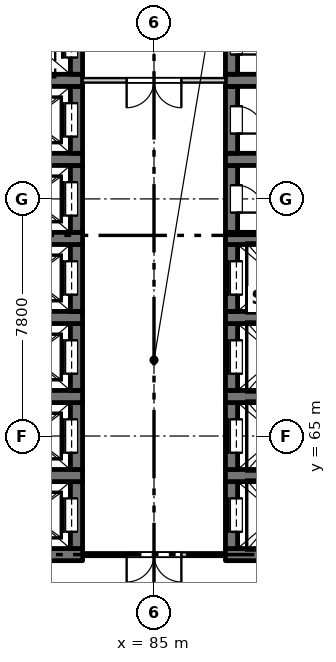
"""IFC4 building model, lengths in metres.
Left out: names, types, materials, properties, quantities, classifications, styles, units other than length and angle.
Written with IfcOpenShell. Run it as: python <this file> out.ifc"""

import sys

from ifc_helpers import new_model, si_unit, direction, frame, frame_2d, origin, place, context, subcontext, project, spatial, rectangle, extrude, element, fill, save


model = new_model("IFC4")
c1 = context("Model", 3, precision=1e-05, world=origin(), true_north=direction((0.0, 1.0)))
c2 = subcontext(c1, "Body", "Model", "MODEL_VIEW")
j1 = project(units=[si_unit("LENGTHUNIT", "METRE"), si_unit("PLANEANGLEUNIT", "RADIAN")], contexts=[c1])
p1 = place(None, origin())
s1 = spatial("IfcSite", under=j1, at=p1, CompositionType="ELEMENT")
p2 = place(p1, origin())
s2 = spatial("IfcBuilding", under=s1, at=p2, CompositionType="ELEMENT")
p3 = place(p2, origin())
s3 = spatial("IfcBuildingStorey", under=s2, at=p3, CompositionType="ELEMENT", Elevation=0.0)
p4 = place(p3, frame((79.65, 61.1, -0.4), z_axis=(0.0, 0.0, 1.0), x_axis=(1.0, 0.0, 0.0)))
e1 = element("IfcWall", 1, at=p4, inside=s3, PredefinedType="SOLIDWALL", context=c2, shape_type="SweptSolid", body=[
    extrude(rectangle(XDim=3.0, YDim=0.4, at=frame_2d((1.5, 0.0))), origin(), (0.0, 0.0, 1.0), 6.1),
])
p5 = place(p3, frame((82.45, 61.3, -0.4), z_axis=(0.0, 0.0, 1.0), x_axis=(0.0, 1.0, 0.0)))
e2 = element("IfcWall", 2, at=p5, inside=s3, PredefinedType="SOLIDWALL", context=c2, shape_type="SweptSolid", body=[
    extrude(rectangle(XDim=2.2, YDim=0.4, at=frame_2d((1.1, 0.0))), origin(), (0.0, 0.0, 1.0), 6.1),
])
p6 = place(p5, frame((0.55, 0.0, 0.4)))
e3 = element("IfcOpeningElement", 3, at=p6, cuts=e2, PredefinedType="OPENING", context=c2, shape_type="SweptSolid", body=[
    extrude(rectangle(XDim=1.1, YDim=2.1, at=frame_2d((0.55, 1.05))), frame((0.0, 0.21, 0.0), z_axis=(0.0, -1.0, 0.0), x_axis=(1.0, 0.0, 0.0)), (0.0, 0.0, 1.0), 0.42),
])
p7 = place(p3, frame((79.65, 63.7, -0.4), z_axis=(0.0, 0.0, 1.0), x_axis=(1.0, 0.0, 0.0)))
e4 = element("IfcWall", 4, at=p7, inside=s3, PredefinedType="SOLIDWALL", context=c2, shape_type="SweptSolid", body=[
    extrude(rectangle(XDim=3.0, YDim=0.4, at=frame_2d((1.5, 0.0))), origin(), (0.0, 0.0, 1.0), 6.1),
])
p8 = place(p3, frame((82.45, 63.9, -0.4), z_axis=(0.0, 0.0, 1.0), x_axis=(0.0, 1.0, 0.0)))
e5 = element("IfcWall", 5, at=p8, inside=s3, PredefinedType="SOLIDWALL", context=c2, shape_type="SweptSolid", body=[
    extrude(rectangle(XDim=2.2, YDim=0.4, at=frame_2d((1.1, 0.0))), origin(), (0.0, 0.0, 1.0), 6.1),
])
p9 = place(p8, frame((0.55, 0.0, 0.4)))
e6 = element("IfcOpeningElement", 6, at=p9, cuts=e5, PredefinedType="OPENING", context=c2, shape_type="SweptSolid", body=[
    extrude(rectangle(XDim=1.1, YDim=2.1, at=frame_2d((0.55, 1.05))), frame((0.0, 0.21, 0.0), z_axis=(0.0, -1.0, 0.0), x_axis=(1.0, 0.0, 0.0)), (0.0, 0.0, 1.0), 0.42),
])
p10 = place(p3, frame((79.65, 66.3, -0.4), z_axis=(0.0, 0.0, 1.0), x_axis=(1.0, 0.0, 0.0)))
e7 = element("IfcWall", 7, at=p10, inside=s3, PredefinedType="SOLIDWALL", context=c2, shape_type="SweptSolid", body=[
    extrude(rectangle(XDim=3.0, YDim=0.4, at=frame_2d((1.5, 0.0))), origin(), (0.0, 0.0, 1.0), 6.1),
])
p11 = place(p3, frame((82.45, 66.5, -0.4), z_axis=(0.0, 0.0, 1.0), x_axis=(0.0, 1.0, 0.0)))
e8 = element("IfcWall", 8, at=p11, inside=s3, PredefinedType="SOLIDWALL", context=c2, shape_type="SweptSolid", body=[
    extrude(rectangle(XDim=2.2, YDim=0.4, at=frame_2d((1.1, 0.0))), origin(), (0.0, 0.0, 1.0), 6.1),
])
p12 = place(p11, frame((0.55, 0.0, 0.4)))
e9 = element("IfcOpeningElement", 9, at=p12, cuts=e8, PredefinedType="OPENING", context=c2, shape_type="SweptSolid", body=[
    extrude(rectangle(XDim=1.1, YDim=2.1, at=frame_2d((0.55, 1.05))), frame((0.0, 0.21, 0.0), z_axis=(0.0, -1.0, 0.0), x_axis=(1.0, 0.0, 0.0)), (0.0, 0.0, 1.0), 0.42),
])
p13 = place(p3, frame((79.65, 68.9, -0.4), z_axis=(0.0, 0.0, 1.0), x_axis=(1.0, 0.0, 0.0)))
e10 = element("IfcWall", 10, at=p13, inside=s3, PredefinedType="SOLIDWALL", context=c2, shape_type="SweptSolid", body=[
    extrude(rectangle(XDim=3.0, YDim=0.4, at=frame_2d((1.5, 0.0))), origin(), (0.0, 0.0, 1.0), 6.1),
])
p14 = place(p3, frame((82.45, 69.1, -0.4), z_axis=(0.0, 0.0, 1.0), x_axis=(0.0, 1.0, 0.0)))
e11 = element("IfcWall", 11, at=p14, inside=s3, PredefinedType="SOLIDWALL", context=c2, shape_type="SweptSolid", body=[
    extrude(rectangle(XDim=2.2, YDim=0.4, at=frame_2d((1.1, 0.0))), origin(), (0.0, 0.0, 1.0), 6.1),
])
p15 = place(p14, frame((0.55, 0.0, 0.4)))
e12 = element("IfcOpeningElement", 12, at=p15, cuts=e11, PredefinedType="OPENING", context=c2, shape_type="SweptSolid", body=[
    extrude(rectangle(XDim=1.1, YDim=2.1, at=frame_2d((0.55, 1.05))), frame((0.0, 0.21, 0.0), z_axis=(0.0, -1.0, 0.0), x_axis=(1.0, 0.0, 0.0)), (0.0, 0.0, 1.0), 0.42),
])
p16 = place(p3, frame((79.65, 71.5, -0.4), z_axis=(0.0, 0.0, 1.0), x_axis=(1.0, 0.0, 0.0)))
e13 = element("IfcWall", 13, at=p16, inside=s3, PredefinedType="SOLIDWALL", context=c2, shape_type="SweptSolid", body=[
    extrude(rectangle(XDim=3.0, YDim=0.4, at=frame_2d((1.5, 0.0))), origin(), (0.0, 0.0, 1.0), 6.1),
])
p17 = place(p3, frame((82.45, 71.7, -0.4), z_axis=(0.0, 0.0, 1.0), x_axis=(0.0, 1.0, 0.0)))
e14 = element("IfcWall", 14, at=p17, inside=s3, PredefinedType="SOLIDWALL", context=c2, shape_type="SweptSolid", body=[
    extrude(rectangle(XDim=2.2, YDim=0.4, at=frame_2d((1.1, 0.0))), origin(), (0.0, 0.0, 1.0), 6.1),
])
p18 = place(p17, frame((0.55, 0.0, 0.4)))
e15 = element("IfcOpeningElement", 15, at=p18, cuts=e14, PredefinedType="OPENING", context=c2, shape_type="SweptSolid", body=[
    extrude(rectangle(XDim=1.1, YDim=2.1, at=frame_2d((0.55, 1.05))), frame((0.0, 0.21, 0.0), z_axis=(0.0, -1.0, 0.0), x_axis=(1.0, 0.0, 0.0)), (0.0, 0.0, 1.0), 0.42),
])
p19 = place(p3, frame((79.65, 74.1, -0.4), z_axis=(0.0, 0.0, 1.0), x_axis=(1.0, 0.0, 0.0)))
e16 = element("IfcWall", 16, at=p19, inside=s3, PredefinedType="SOLIDWALL", context=c2, shape_type="SweptSolid", body=[
    extrude(rectangle(XDim=3.0, YDim=0.4, at=frame_2d((1.5, 0.0))), origin(), (0.0, 0.0, 1.0), 6.1),
])
p20 = place(p3, frame((82.45, 74.3, -0.4), z_axis=(0.0, 0.0, 1.0), x_axis=(0.0, 1.0, 0.0)))
e17 = element("IfcWall", 17, at=p20, inside=s3, PredefinedType="SOLIDWALL", context=c2, shape_type="SweptSolid", body=[
    extrude(rectangle(XDim=2.2, YDim=0.4, at=frame_2d((1.1, 0.0))), origin(), (0.0, 0.0, 1.0), 6.1),
])
p21 = place(p20, frame((0.55, 0.0, 0.4)))
e18 = element("IfcOpeningElement", 18, at=p21, cuts=e17, PredefinedType="OPENING", context=c2, shape_type="SweptSolid", body=[
    extrude(rectangle(XDim=1.1, YDim=2.1, at=frame_2d((0.55, 1.05))), frame((0.0, 0.21, 0.0), z_axis=(0.0, -1.0, 0.0), x_axis=(1.0, 0.0, 0.0)), (0.0, 0.0, 1.0), 0.42),
])
p22 = place(p3, frame((79.65, 76.7, -0.4), z_axis=(0.0, 0.0, 1.0), x_axis=(1.0, 0.0, 0.0)))
e19 = element("IfcWall", 19, at=p22, inside=s3, PredefinedType="SOLIDWALL", context=c2, shape_type="SweptSolid", body=[
    extrude(rectangle(XDim=3.0, YDim=0.4, at=frame_2d((1.5, 0.0))), origin(), (0.0, 0.0, 1.0), 6.1),
])
p23 = place(p3, frame((82.45, 76.9, -0.4), z_axis=(0.0, 0.0, 1.0), x_axis=(0.0, 1.0, 0.0)))
e20 = element("IfcWall", 20, at=p23, inside=s3, PredefinedType="SOLIDWALL", context=c2, shape_type="SweptSolid", body=[
    extrude(rectangle(XDim=2.2, YDim=0.4, at=frame_2d((1.1, 0.0))), origin(), (0.0, 0.0, 1.0), 6.1),
])
p24 = place(p23, frame((0.55, 0.0, 0.4)))
e21 = element("IfcOpeningElement", 21, at=p24, cuts=e20, PredefinedType="OPENING", context=c2, shape_type="SweptSolid", body=[
    extrude(rectangle(XDim=1.1, YDim=2.1, at=frame_2d((0.55, 1.05))), frame((0.0, 0.21, 0.0), z_axis=(0.0, -1.0, 0.0), x_axis=(1.0, 0.0, 0.0)), (0.0, 0.0, 1.0), 0.42),
])
p25 = place(p3, frame((87.35, 61.1, -0.4), z_axis=(0.0, 0.0, 1.0), x_axis=(1.0, 0.0, 0.0)))
e22 = element("IfcWall", 22, at=p25, inside=s3, PredefinedType="SOLIDWALL", context=c2, shape_type="SweptSolid", body=[
    extrude(rectangle(XDim=3.0, YDim=0.4, at=frame_2d((1.5, 0.0))), origin(), (0.0, 0.0, 1.0), 6.1),
])
p26 = place(p3, frame((87.55, 61.3, -0.4), z_axis=(0.0, 0.0, 1.0), x_axis=(0.0, 1.0, 0.0)))
e23 = element("IfcWall", 23, at=p26, inside=s3, PredefinedType="SOLIDWALL", context=c2, shape_type="SweptSolid", body=[
    extrude(rectangle(XDim=2.2, YDim=0.4, at=frame_2d((1.1, 0.0))), origin(), (0.0, 0.0, 1.0), 6.1),
])
p27 = place(p26, frame((0.55, 0.0, 0.4)))
e24 = element("IfcOpeningElement", 24, at=p27, cuts=e23, PredefinedType="OPENING", context=c2, shape_type="SweptSolid", body=[
    extrude(rectangle(XDim=1.1, YDim=2.1, at=frame_2d((0.55, 1.05))), frame((0.0, 0.21, 0.0), z_axis=(0.0, -1.0, 0.0), x_axis=(1.0, 0.0, 0.0)), (0.0, 0.0, 1.0), 0.42),
])
p28 = place(p3, frame((87.35, 63.7, -0.4), z_axis=(0.0, 0.0, 1.0), x_axis=(1.0, 0.0, 0.0)))
e25 = element("IfcWall", 25, at=p28, inside=s3, PredefinedType="SOLIDWALL", context=c2, shape_type="SweptSolid", body=[
    extrude(rectangle(XDim=3.0, YDim=0.4, at=frame_2d((1.5, 0.0))), origin(), (0.0, 0.0, 1.0), 6.1),
])
p29 = place(p3, frame((87.55, 63.9, -0.4), z_axis=(0.0, 0.0, 1.0), x_axis=(0.0, 1.0, 0.0)))
e26 = element("IfcWall", 26, at=p29, inside=s3, PredefinedType="SOLIDWALL", context=c2, shape_type="SweptSolid", body=[
    extrude(rectangle(XDim=2.2, YDim=0.4, at=frame_2d((1.1, 0.0))), origin(), (0.0, 0.0, 1.0), 6.1),
])
p30 = place(p29, frame((0.55, 0.0, 0.4)))
e27 = element("IfcOpeningElement", 27, at=p30, cuts=e26, PredefinedType="OPENING", context=c2, shape_type="SweptSolid", body=[
    extrude(rectangle(XDim=1.1, YDim=2.1, at=frame_2d((0.55, 1.05))), frame((0.0, 0.21, 0.0), z_axis=(0.0, -1.0, 0.0), x_axis=(1.0, 0.0, 0.0)), (0.0, 0.0, 1.0), 0.42),
])
p31 = place(p3, frame((87.35, 66.3, -0.4), z_axis=(0.0, 0.0, 1.0), x_axis=(1.0, 0.0, 0.0)))
e28 = element("IfcWall", 28, at=p31, inside=s3, PredefinedType="SOLIDWALL", context=c2, shape_type="SweptSolid", body=[
    extrude(rectangle(XDim=3.0, YDim=0.4, at=frame_2d((1.5, 0.0))), origin(), (0.0, 0.0, 1.0), 6.1),
])
p32 = place(p3, frame((87.55, 66.5, -0.4), z_axis=(0.0, 0.0, 1.0), x_axis=(0.0, 1.0, 0.0)))
e29 = element("IfcWall", 29, at=p32, inside=s3, PredefinedType="SOLIDWALL", context=c2, shape_type="SweptSolid", body=[
    extrude(rectangle(XDim=2.2, YDim=0.4, at=frame_2d((1.1, 0.0))), origin(), (0.0, 0.0, 1.0), 6.1),
])
p33 = place(p32, frame((0.55, 0.0, 0.4)))
e30 = element("IfcOpeningElement", 30, at=p33, cuts=e29, PredefinedType="OPENING", context=c2, shape_type="SweptSolid", body=[
    extrude(rectangle(XDim=1.1, YDim=2.1, at=frame_2d((0.55, 1.05))), frame((0.0, 0.21, 0.0), z_axis=(0.0, -1.0, 0.0), x_axis=(1.0, 0.0, 0.0)), (0.0, 0.0, 1.0), 0.42),
])
p34 = place(p3, frame((87.35, 68.9, -0.4), z_axis=(0.0, 0.0, 1.0), x_axis=(1.0, 0.0, 0.0)))
e31 = element("IfcWall", 31, at=p34, inside=s3, PredefinedType="SOLIDWALL", context=c2, shape_type="SweptSolid", body=[
    extrude(rectangle(XDim=3.0, YDim=0.4, at=frame_2d((1.5, 0.0))), origin(), (0.0, 0.0, 1.0), 6.1),
])
p35 = place(p3, frame((87.55, 69.1, -0.4), z_axis=(0.0, 0.0, 1.0), x_axis=(0.0, 1.0, 0.0)))
e32 = element("IfcWall", 32, at=p35, inside=s3, PredefinedType="SOLIDWALL", context=c2, shape_type="SweptSolid", body=[
    extrude(rectangle(XDim=2.2, YDim=0.4, at=frame_2d((1.1, 0.0))), origin(), (0.0, 0.0, 1.0), 6.1),
])
p36 = place(p35, frame((0.55, 0.0, 0.4)))
e33 = element("IfcOpeningElement", 33, at=p36, cuts=e32, PredefinedType="OPENING", context=c2, shape_type="SweptSolid", body=[
    extrude(rectangle(XDim=1.1, YDim=2.1, at=frame_2d((0.55, 1.05))), frame((0.0, 0.21, 0.0), z_axis=(0.0, -1.0, 0.0), x_axis=(1.0, 0.0, 0.0)), (0.0, 0.0, 1.0), 0.42),
])
p37 = place(p3, frame((87.35, 71.5, -0.4), z_axis=(0.0, 0.0, 1.0), x_axis=(1.0, 0.0, 0.0)))
e34 = element("IfcWall", 34, at=p37, inside=s3, PredefinedType="SOLIDWALL", context=c2, shape_type="SweptSolid", body=[
    extrude(rectangle(XDim=3.0, YDim=0.4, at=frame_2d((1.5, 0.0))), origin(), (0.0, 0.0, 1.0), 6.1),
])
p38 = place(p3, frame((87.55, 71.7, -0.4), z_axis=(0.0, 0.0, 1.0), x_axis=(0.0, 1.0, 0.0)))
e35 = element("IfcWall", 35, at=p38, inside=s3, PredefinedType="SOLIDWALL", context=c2, shape_type="SweptSolid", body=[
    extrude(rectangle(XDim=2.2, YDim=0.4, at=frame_2d((1.1, 0.0))), origin(), (0.0, 0.0, 1.0), 6.1),
])
p39 = place(p38, frame((0.65, 0.0, 0.4)))
e36 = element("IfcOpeningElement", 36, at=p39, cuts=e35, PredefinedType="OPENING", context=c2, shape_type="SweptSolid", body=[
    extrude(rectangle(XDim=0.9, YDim=2.1, at=frame_2d((0.45, 1.05))), frame((0.0, 0.21, 0.0), z_axis=(0.0, -1.0, 0.0), x_axis=(1.0, 0.0, 0.0)), (0.0, 0.0, 1.0), 0.42),
])
p40 = place(p3, frame((87.35, 74.1, -0.4), z_axis=(0.0, 0.0, 1.0), x_axis=(1.0, 0.0, 0.0)))
e37 = element("IfcWall", 37, at=p40, inside=s3, PredefinedType="SOLIDWALL", context=c2, shape_type="SweptSolid", body=[
    extrude(rectangle(XDim=3.0, YDim=0.4, at=frame_2d((1.5, 0.0))), origin(), (0.0, 0.0, 1.0), 6.1),
])
p41 = place(p3, frame((87.55, 74.3, -0.4), z_axis=(0.0, 0.0, 1.0), x_axis=(0.0, 1.0, 0.0)))
e38 = element("IfcWall", 38, at=p41, inside=s3, PredefinedType="SOLIDWALL", context=c2, shape_type="SweptSolid", body=[
    extrude(rectangle(XDim=2.2, YDim=0.4, at=frame_2d((1.1, 0.0))), origin(), (0.0, 0.0, 1.0), 6.1),
])
p42 = place(p41, frame((0.65, 0.0, 0.4)))
e39 = element("IfcOpeningElement", 39, at=p42, cuts=e38, PredefinedType="OPENING", context=c2, shape_type="SweptSolid", body=[
    extrude(rectangle(XDim=0.9, YDim=2.1, at=frame_2d((0.45, 1.05))), frame((0.0, 0.21, 0.0), z_axis=(0.0, -1.0, 0.0), x_axis=(1.0, 0.0, 0.0)), (0.0, 0.0, 1.0), 0.42),
])
p43 = place(p3, frame((87.35, 76.7, -0.4), z_axis=(0.0, 0.0, 1.0), x_axis=(1.0, 0.0, 0.0)))
e40 = element("IfcWall", 40, at=p43, inside=s3, PredefinedType="SOLIDWALL", context=c2, shape_type="SweptSolid", body=[
    extrude(rectangle(XDim=3.0, YDim=0.4, at=frame_2d((1.5, 0.0))), origin(), (0.0, 0.0, 1.0), 6.1),
])
p44 = place(p3, frame((87.55, 76.9, -0.4), z_axis=(0.0, 0.0, 1.0), x_axis=(0.0, 1.0, 0.0)))
e41 = element("IfcWall", 41, at=p44, inside=s3, PredefinedType="SOLIDWALL", context=c2, shape_type="SweptSolid", body=[
    extrude(rectangle(XDim=2.2, YDim=0.4, at=frame_2d((1.1, 0.0))), origin(), (0.0, 0.0, 1.0), 6.1),
])
p45 = place(p44, frame((0.65, 0.0, 0.4)))
e42 = element("IfcOpeningElement", 42, at=p45, cuts=e41, PredefinedType="OPENING", context=c2, shape_type="SweptSolid", body=[
    extrude(rectangle(XDim=0.9, YDim=2.1, at=frame_2d((0.45, 1.05))), frame((0.0, 0.21, 0.0), z_axis=(0.0, -1.0, 0.0), x_axis=(1.0, 0.0, 0.0)), (0.0, 0.0, 1.0), 0.42),
])
p46 = place(p3, frame((82.65, 61.1, 0.0), z_axis=(0.0, 0.0, 1.0), x_axis=(1.0, 0.0, 0.0)))
e43 = element("IfcWall", 43, at=p46, inside=s3, PredefinedType="PARTITIONING", context=c2, shape_type="SweptSolid", body=[
    extrude(rectangle(XDim=4.7, YDim=0.15, at=frame_2d((2.35, 0.0))), origin(), (0.0, 0.0, 1.0), 5.7),
])
p47 = place(p46, frame((1.45, 0.0, 0.0)))
e44 = element("IfcOpeningElement", 44, at=p47, cuts=e43, PredefinedType="OPENING", context=c2, shape_type="SweptSolid", body=[
    extrude(rectangle(XDim=1.8, YDim=2.1, at=frame_2d((0.9, 1.05))), frame((0.0, 0.085, 0.0), z_axis=(0.0, -1.0, 0.0), x_axis=(1.0, 0.0, 0.0)), (0.0, 0.0, 1.0), 0.17),
])
p48 = place(p3, frame((82.65, 76.7, 0.0), z_axis=(0.0, 0.0, 1.0), x_axis=(1.0, 0.0, 0.0)))
e45 = element("IfcWall", 45, at=p48, inside=s3, PredefinedType="PARTITIONING", context=c2, shape_type="SweptSolid", body=[
    extrude(rectangle(XDim=4.7, YDim=0.15, at=frame_2d((2.35, 0.0))), origin(), (0.0, 0.0, 1.0), 5.7),
])
p49 = place(p48, frame((1.45, 0.0, 0.0)))
e46 = element("IfcOpeningElement", 46, at=p49, cuts=e45, PredefinedType="OPENING", context=c2, shape_type="SweptSolid", body=[
    extrude(rectangle(XDim=1.8, YDim=2.1, at=frame_2d((0.9, 1.05))), frame((0.0, 0.085, 0.0), z_axis=(0.0, -1.0, 0.0), x_axis=(1.0, 0.0, 0.0)), (0.0, 0.0, 1.0), 0.17),
])
p50 = place(p47, origin())
e47 = element("IfcDoor", 47, at=p50, inside=s3, OperationType="DOUBLE_DOOR_SINGLE_SWING", PredefinedType="DOOR", context=c2, shape_type="SweptSolid", body=[
    extrude(rectangle(XDim=1.8, YDim=2.1, at=frame_2d((0.9, 1.05))), frame((0.0, 0.025, 0.0), z_axis=(0.0, -1.0, 0.0), x_axis=(1.0, 0.0, 0.0)), (0.0, 0.0, 1.0), 0.05),
])
fill(e44, e47)
p51 = place(p6, origin())
e48 = element("IfcDoor", 48, at=p51, inside=s3, OperationType="SLIDING_TO_RIGHT", PredefinedType="DOOR", context=c2, shape_type="SweptSolid", body=[
    extrude(rectangle(XDim=1.1, YDim=2.1, at=frame_2d((0.55, 1.05))), frame((0.0, 0.185, 0.0), z_axis=(0.0, -1.0, 0.0), x_axis=(1.0, 0.0, 0.0)), (0.0, 0.0, 1.0), 0.05),
])
fill(e3, e48)
p52 = place(p27, origin())
e49 = element("IfcDoor", 49, at=p52, inside=s3, OperationType="SLIDING_TO_RIGHT", PredefinedType="DOOR", context=c2, shape_type="SweptSolid", body=[
    extrude(rectangle(XDim=1.1, YDim=2.1, at=frame_2d((0.55, 1.05))), frame((0.0, -0.135, 0.0), z_axis=(0.0, -1.0, 0.0), x_axis=(1.0, 0.0, 0.0)), (0.0, 0.0, 1.0), 0.05),
])
fill(e24, e49)
p53 = place(p9, origin())
e50 = element("IfcDoor", 50, at=p53, inside=s3, OperationType="SLIDING_TO_RIGHT", PredefinedType="DOOR", context=c2, shape_type="SweptSolid", body=[
    extrude(rectangle(XDim=1.1, YDim=2.1, at=frame_2d((0.55, 1.05))), frame((0.0, 0.185, 0.0), z_axis=(0.0, -1.0, 0.0), x_axis=(1.0, 0.0, 0.0)), (0.0, 0.0, 1.0), 0.05),
])
fill(e6, e50)
p54 = place(p30, origin())
e51 = element("IfcDoor", 51, at=p54, inside=s3, OperationType="SLIDING_TO_RIGHT", PredefinedType="DOOR", context=c2, shape_type="SweptSolid", body=[
    extrude(rectangle(XDim=1.1, YDim=2.1, at=frame_2d((0.55, 1.05))), frame((0.0, -0.135, 0.0), z_axis=(0.0, -1.0, 0.0), x_axis=(1.0, 0.0, 0.0)), (0.0, 0.0, 1.0), 0.05),
])
fill(e27, e51)
p55 = place(p12, origin())
e52 = element("IfcDoor", 52, at=p55, inside=s3, OperationType="SLIDING_TO_RIGHT", PredefinedType="DOOR", context=c2, shape_type="SweptSolid", body=[
    extrude(rectangle(XDim=1.1, YDim=2.1, at=frame_2d((0.55, 1.05))), frame((0.0, 0.185, 0.0), z_axis=(0.0, -1.0, 0.0), x_axis=(1.0, 0.0, 0.0)), (0.0, 0.0, 1.0), 0.05),
])
fill(e9, e52)
p56 = place(p33, origin())
e53 = element("IfcDoor", 53, at=p56, inside=s3, OperationType="SLIDING_TO_RIGHT", PredefinedType="DOOR", context=c2, shape_type="SweptSolid", body=[
    extrude(rectangle(XDim=1.1, YDim=2.1, at=frame_2d((0.55, 1.05))), frame((0.0, -0.135, 0.0), z_axis=(0.0, -1.0, 0.0), x_axis=(1.0, 0.0, 0.0)), (0.0, 0.0, 1.0), 0.05),
])
fill(e30, e53)
p57 = place(p15, origin())
e54 = element("IfcDoor", 54, at=p57, inside=s3, OperationType="SLIDING_TO_LEFT", PredefinedType="DOOR", context=c2, shape_type="SweptSolid", body=[
    extrude(rectangle(XDim=1.1, YDim=2.1, at=frame_2d((0.55, 1.05))), frame((0.0, 0.185, 0.0), z_axis=(0.0, -1.0, 0.0), x_axis=(1.0, 0.0, 0.0)), (0.0, 0.0, 1.0), 0.05),
])
fill(e12, e54)
p58 = place(p36, origin())
e55 = element("IfcDoor", 55, at=p58, inside=s3, OperationType="SLIDING_TO_LEFT", PredefinedType="DOOR", context=c2, shape_type="SweptSolid", body=[
    extrude(rectangle(XDim=1.1, YDim=2.1, at=frame_2d((0.55, 1.05))), frame((0.0, -0.135, 0.0), z_axis=(0.0, -1.0, 0.0), x_axis=(1.0, 0.0, 0.0)), (0.0, 0.0, 1.0), 0.05),
])
fill(e33, e55)
p59 = place(p18, origin())
e56 = element("IfcDoor", 56, at=p59, inside=s3, OperationType="SLIDING_TO_LEFT", PredefinedType="DOOR", context=c2, shape_type="SweptSolid", body=[
    extrude(rectangle(XDim=1.1, YDim=2.1, at=frame_2d((0.55, 1.05))), frame((0.0, 0.185, 0.0), z_axis=(0.0, -1.0, 0.0), x_axis=(1.0, 0.0, 0.0)), (0.0, 0.0, 1.0), 0.05),
])
fill(e15, e56)
p60 = place(p39, origin())
e57 = element("IfcDoor", 57, at=p60, inside=s3, OperationType="SINGLE_SWING_RIGHT", PredefinedType="DOOR", context=c2, shape_type="SweptSolid", body=[
    extrude(rectangle(XDim=0.9, YDim=2.1, at=frame_2d((0.45, 1.05))), frame((0.0, -0.135, 0.0), z_axis=(0.0, -1.0, 0.0), x_axis=(1.0, 0.0, 0.0)), (0.0, 0.0, 1.0), 0.05),
])
fill(e36, e57)
p61 = place(p21, origin())
e58 = element("IfcDoor", 58, at=p61, inside=s3, OperationType="SLIDING_TO_LEFT", PredefinedType="DOOR", context=c2, shape_type="SweptSolid", body=[
    extrude(rectangle(XDim=1.1, YDim=2.1, at=frame_2d((0.55, 1.05))), frame((0.0, 0.185, 0.0), z_axis=(0.0, -1.0, 0.0), x_axis=(1.0, 0.0, 0.0)), (0.0, 0.0, 1.0), 0.05),
])
fill(e18, e58)
p62 = place(p42, origin())
e59 = element("IfcDoor", 59, at=p62, inside=s3, OperationType="SINGLE_SWING_RIGHT", PredefinedType="DOOR", context=c2, shape_type="SweptSolid", body=[
    extrude(rectangle(XDim=0.9, YDim=2.1, at=frame_2d((0.45, 1.05))), frame((0.0, -0.135, 0.0), z_axis=(0.0, -1.0, 0.0), x_axis=(1.0, 0.0, 0.0)), (0.0, 0.0, 1.0), 0.05),
])
fill(e39, e59)
p63 = place(p49, origin())
e60 = element("IfcDoor", 60, at=p63, inside=s3, OperationType="DOUBLE_DOOR_SINGLE_SWING", PredefinedType="DOOR", context=c2, shape_type="SweptSolid", body=[
    extrude(rectangle(XDim=1.8, YDim=2.1, at=frame_2d((0.9, 1.05))), frame((0.0, 0.025, 0.0), z_axis=(0.0, -1.0, 0.0), x_axis=(1.0, 0.0, 0.0)), (0.0, 0.0, 1.0), 0.05),
])
fill(e46, e60)
p64 = place(p24, origin())
e61 = element("IfcDoor", 61, at=p64, inside=s3, OperationType="SLIDING_TO_LEFT", PredefinedType="DOOR", context=c2, shape_type="SweptSolid", body=[
    extrude(rectangle(XDim=1.1, YDim=2.1, at=frame_2d((0.55, 1.05))), frame((0.0, 0.185, 0.0), z_axis=(0.0, -1.0, 0.0), x_axis=(1.0, 0.0, 0.0)), (0.0, 0.0, 1.0), 0.05),
])
fill(e21, e61)
p65 = place(p45, origin())
e62 = element("IfcDoor", 62, at=p65, inside=s3, OperationType="SINGLE_SWING_RIGHT", PredefinedType="DOOR", context=c2, shape_type="SweptSolid", body=[
    extrude(rectangle(XDim=0.9, YDim=2.1, at=frame_2d((0.45, 1.05))), frame((0.0, -0.135, 0.0), z_axis=(0.0, -1.0, 0.0), x_axis=(1.0, 0.0, 0.0)), (0.0, 0.0, 1.0), 0.05),
])
fill(e42, e62)
save(model, sys.argv[1])
